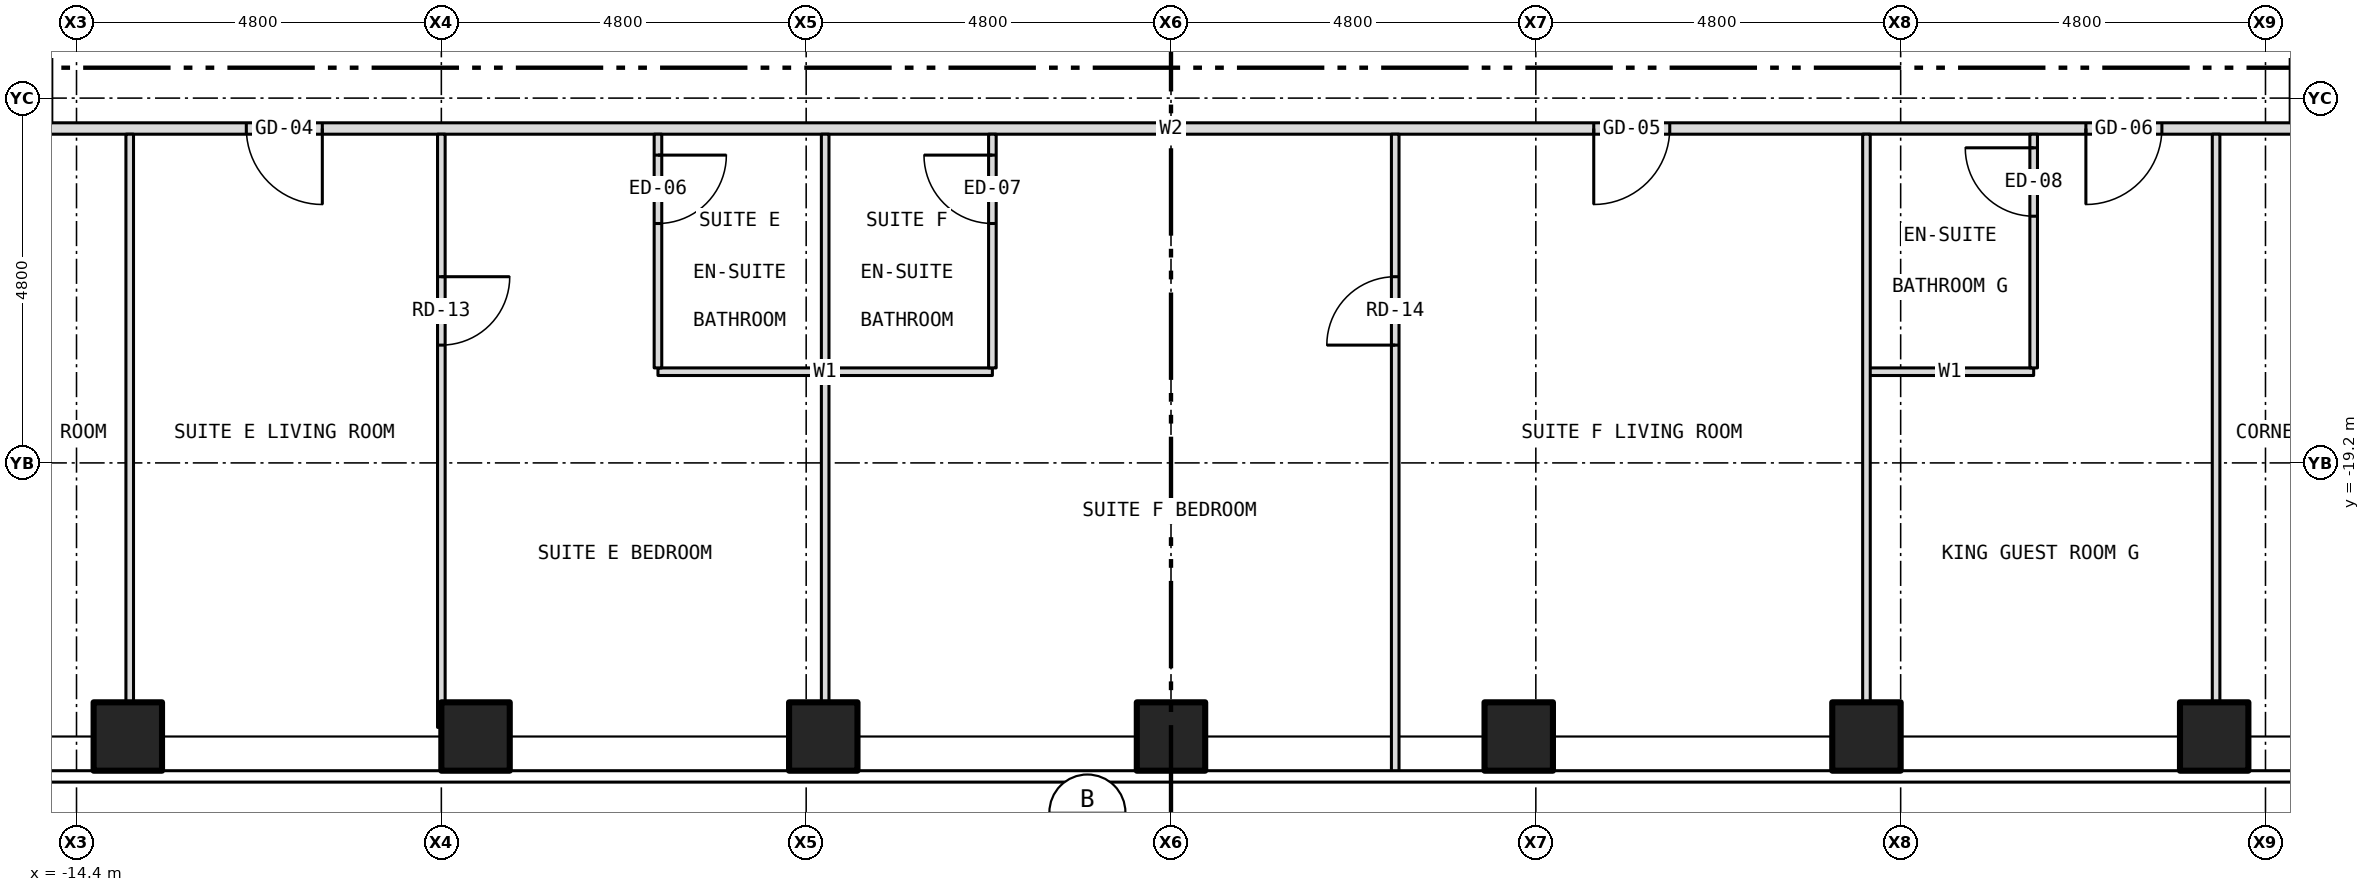
"""IFC4 building model, lengths in metres.
Left out: names, types, materials, properties, quantities, classifications, styles, units other than length and angle.
Written with IfcOpenShell. Run it as: python <this file> out.ifc"""

import sys

from ifc_helpers import new_model, si_unit, direction, frame, frame_2d, origin, origin_2d, place, context, subcontext, project, spatial, rectangle, hollow_rectangle, extrude, element, fill, save


model = new_model("IFC4")
c1 = context("Model", 3, precision=1e-05, world=origin(), true_north=direction((0.0, 1.0)))
c2 = subcontext(c1, "Body", "Model", "MODEL_VIEW")
j1 = project(units=[si_unit("LENGTHUNIT", "METRE"), si_unit("PLANEANGLEUNIT", "RADIAN")], contexts=[c1])
p1 = place(None, origin())
s1 = spatial("IfcSite", under=j1, at=p1, CompositionType="ELEMENT")
p2 = place(p1, origin())
s2 = spatial("IfcBuilding", under=s1, at=p2, CompositionType="ELEMENT")
p3 = place(p2, frame((0.0, 0.0, 113.5)))
s3 = spatial("IfcBuildingStorey", under=s2, at=p3, CompositionType="ELEMENT", Elevation=113.5)
for number, where, z_axis, x_axis in (
    (1, (-13.725, -22.8, -0.15), (0.0, 0.0, 1.0), (1.0, 0.0, 0.0)),
    (2, (-9.15, -22.8, -0.15), (0.0, 0.0, 1.0), (1.0, 0.0, 0.0)),
    (3, (-4.575, -22.8, -0.15), (0.0, 0.0, 1.0), (1.0, 0.0, 0.0)),
    (4, (0.0, -22.8, -0.15), (0.0, 0.0, 1.0), (1.0, 0.0, 0.0)),
    (5, (4.575, -22.8, -0.15), (0.0, 0.0, 1.0), (1.0, 0.0, 0.0)),
    (6, (9.15, -22.8, -0.15), (0.0, 0.0, 1.0), (1.0, 0.0, 0.0)),
    (7, (13.725, -22.8, -0.15), (0.0, 0.0, 1.0), (1.0, 0.0, 0.0)),
):
    element("IfcColumn", number, at=place(p3, frame(where, z_axis=z_axis, x_axis=x_axis)), inside=s3, PredefinedType="COLUMN", context=c2, shape_type="SweptSolid", body=[
        extrude(hollow_rectangle(XDim=0.9, YDim=0.9, WallThickness=0.05, at=origin_2d()), origin(), (0.0, 0.0, 1.0), 3.5),
    ])
p4 = place(p3, frame((-6.75, -18.0, 0.0), z_axis=(0.0, 0.0, 1.0), x_axis=(1.0, 0.0, 0.0)))
e8 = element("IfcWall", 8, at=p4, inside=s3, PredefinedType="PARTITIONING", context=c2, shape_type="SweptSolid", body=[
    extrude(rectangle(XDim=4.4, YDim=0.1, at=frame_2d((2.2, 0.0))), origin(), (0.0, 0.0, 1.0), 3.35),
])
p5 = place(p3, frame((9.15, -18.0, 0.0), z_axis=(0.0, 0.0, 1.0), x_axis=(1.0, 0.0, 0.0)))
e9 = element("IfcWall", 9, at=p5, inside=s3, PredefinedType="PARTITIONING", context=c2, shape_type="SweptSolid", body=[
    extrude(rectangle(XDim=2.2, YDim=0.1, at=frame_2d((1.1, 0.0))), origin(), (0.0, 0.0, 1.0), 3.35),
])
p6 = place(p3, frame((-14.8, -14.8, 0.0), z_axis=(0.0, 0.0, 1.0), x_axis=(1.0, 0.0, 0.0)))
e10 = element("IfcWall", 10, at=p6, inside=s3, PredefinedType="PARTITIONING", context=c2, shape_type="SweptSolid", body=[
    extrude(rectangle(XDim=29.6, YDim=0.15, at=frame_2d((14.8, 0.0))), origin(), (0.0, 0.0, 1.0), 3.35),
])
p7 = place(p6, frame((2.634, 0.0, 0.0)))
e11 = element("IfcOpeningElement", 11, at=p7, cuts=e10, PredefinedType="OPENING", context=c2, shape_type="SweptSolid", body=[
    extrude(rectangle(XDim=1.0, YDim=2.1, at=frame_2d((0.5, 1.05))), frame((0.0, 0.087, 0.0), z_axis=(0.0, -1.0, 0.0), x_axis=(1.0, 0.0, 0.0)), (0.0, 0.0, 1.0), 0.174),
])
p8 = place(p6, frame((20.362, 0.0, 0.0)))
e12 = element("IfcOpeningElement", 12, at=p8, cuts=e10, PredefinedType="OPENING", context=c2, shape_type="SweptSolid", body=[
    extrude(rectangle(XDim=1.0, YDim=2.1, at=frame_2d((0.5, 1.05))), frame((0.0, 0.087, 0.0), z_axis=(0.0, -1.0, 0.0), x_axis=(1.0, 0.0, 0.0)), (0.0, 0.0, 1.0), 0.174),
])
p9 = place(p6, frame((26.837, 0.0, 0.0)))
e13 = element("IfcOpeningElement", 13, at=p9, cuts=e10, PredefinedType="OPENING", context=c2, shape_type="SweptSolid", body=[
    extrude(rectangle(XDim=1.0, YDim=2.1, at=frame_2d((0.5, 1.05))), frame((0.0, 0.087, 0.0), z_axis=(0.0, -1.0, 0.0), x_axis=(1.0, 0.0, 0.0)), (0.0, 0.0, 1.0), 0.174),
])
p10 = place(p3, frame((-13.7, -22.68, 0.0), z_axis=(0.0, 0.0, 1.0), x_axis=(0.0, 1.0, 0.0)))
e14 = element("IfcWall", 14, at=p10, inside=s3, PredefinedType="PARTITIONING", context=c2, shape_type="SweptSolid", body=[
    extrude(rectangle(XDim=7.805, YDim=0.1, at=frame_2d((3.902, 0.0))), origin(), (0.0, 0.0, 1.0), 3.35),
])
p11 = place(p3, frame((-9.6, -22.68, 0.0), z_axis=(0.0, 0.0, 1.0), x_axis=(0.0, 1.0, 0.0)))
e15 = element("IfcWall", 15, at=p11, inside=s3, PredefinedType="PARTITIONING", context=c2, shape_type="SweptSolid", body=[
    extrude(rectangle(XDim=0.33, YDim=0.1, at=frame_2d((0.165, 0.0))), origin(), (0.0, 0.0, 1.0), 3.35),
])
p12 = place(p3, frame((-9.6, -22.35, 0.0), z_axis=(0.0, 0.0, 1.0), x_axis=(0.0, 1.0, 0.0)))
e16 = element("IfcWall", 16, at=p12, inside=s3, PredefinedType="PARTITIONING", context=c2, shape_type="SweptSolid", body=[
    extrude(rectangle(XDim=7.475, YDim=0.1, at=frame_2d((3.738, 0.0))), origin(), (0.0, 0.0, 1.0), 2.728),
])
p13 = place(p12, frame((4.7, 0.0, 0.0)))
e17 = element("IfcOpeningElement", 17, at=p13, cuts=e16, PredefinedType="OPENING", context=c2, shape_type="SweptSolid", body=[
    extrude(rectangle(XDim=0.9, YDim=2.1, at=frame_2d((0.45, 1.05))), frame((0.0, 0.062, 0.0), z_axis=(0.0, -1.0, 0.0), x_axis=(1.0, 0.0, 0.0)), (0.0, 0.0, 1.0), 0.124),
])
p14 = place(p3, frame((-6.75, -17.95, 0.0), z_axis=(0.0, 0.0, 1.0), x_axis=(0.0, 1.0, 0.0)))
e18 = element("IfcWall", 18, at=p14, inside=s3, PredefinedType="PARTITIONING", context=c2, shape_type="SweptSolid", body=[
    extrude(rectangle(XDim=3.075, YDim=0.1, at=frame_2d((1.538, 0.0))), origin(), (0.0, 0.0, 1.0), 3.35),
])
p15 = place(p14, frame((1.9, 0.0, 0.0)))
e19 = element("IfcOpeningElement", 19, at=p15, cuts=e18, PredefinedType="OPENING", context=c2, shape_type="SweptSolid", body=[
    extrude(rectangle(XDim=0.9, YDim=2.1, at=frame_2d((0.45, 1.05))), frame((0.0, 0.062, 0.0), z_axis=(0.0, -1.0, 0.0), x_axis=(1.0, 0.0, 0.0)), (0.0, 0.0, 1.0), 0.124),
])
p16 = place(p3, frame((-4.55, -22.68, 0.0), z_axis=(0.0, 0.0, 1.0), x_axis=(0.0, 1.0, 0.0)))
e20 = element("IfcWall", 20, at=p16, inside=s3, PredefinedType="PARTITIONING", context=c2, shape_type="SweptSolid", body=[
    extrude(rectangle(XDim=4.63, YDim=0.1, at=frame_2d((2.315, 0.0))), origin(), (0.0, 0.0, 1.0), 3.35),
])
p17 = place(p3, frame((-4.55, -17.95, 0.0), z_axis=(0.0, 0.0, 1.0), x_axis=(0.0, 1.0, 0.0)))
e21 = element("IfcWall", 21, at=p17, inside=s3, PredefinedType="PARTITIONING", context=c2, shape_type="SweptSolid", body=[
    extrude(rectangle(XDim=3.075, YDim=0.1, at=frame_2d((1.538, 0.0))), origin(), (0.0, 0.0, 1.0), 3.35),
])
p18 = place(p3, frame((-2.35, -17.95, 0.0), z_axis=(0.0, 0.0, 1.0), x_axis=(0.0, 1.0, 0.0)))
e22 = element("IfcWall", 22, at=p18, inside=s3, PredefinedType="PARTITIONING", context=c2, shape_type="SweptSolid", body=[
    extrude(rectangle(XDim=3.075, YDim=0.1, at=frame_2d((1.538, 0.0))), origin(), (0.0, 0.0, 1.0), 3.35),
])
p19 = place(p18, frame((1.9, 0.0, 0.0)))
e23 = element("IfcOpeningElement", 23, at=p19, cuts=e22, PredefinedType="OPENING", context=c2, shape_type="SweptSolid", body=[
    extrude(rectangle(XDim=0.9, YDim=2.1, at=frame_2d((0.45, 1.05))), frame((0.0, 0.062, 0.0), z_axis=(0.0, -1.0, 0.0), x_axis=(1.0, 0.0, 0.0)), (0.0, 0.0, 1.0), 0.124),
])
p20 = place(p3, frame((2.95, -23.28, 0.0), z_axis=(0.0, 0.0, 1.0), x_axis=(0.0, 1.0, 0.0)))
e24 = element("IfcWall", 24, at=p20, inside=s3, PredefinedType="PARTITIONING", context=c2, shape_type="SweptSolid", body=[
    extrude(rectangle(XDim=8.405, YDim=0.1, at=frame_2d((4.203, 0.0))), origin(), (0.0, 0.0, 1.0), 3.35),
])
p21 = place(p20, frame((5.63, 0.0, 0.0)))
e25 = element("IfcOpeningElement", 25, at=p21, cuts=e24, PredefinedType="OPENING", context=c2, shape_type="SweptSolid", body=[
    extrude(rectangle(XDim=0.9, YDim=2.1, at=frame_2d((0.45, 1.05))), frame((0.0, 0.062, 0.0), z_axis=(0.0, -1.0, 0.0), x_axis=(1.0, 0.0, 0.0)), (0.0, 0.0, 1.0), 0.124),
])
p22 = place(p3, frame((9.15, -22.68, 0.0), z_axis=(0.0, 0.0, 1.0), x_axis=(0.0, 1.0, 0.0)))
e26 = element("IfcWall", 26, at=p22, inside=s3, PredefinedType="PARTITIONING", context=c2, shape_type="SweptSolid", body=[
    extrude(rectangle(XDim=7.805, YDim=0.1, at=frame_2d((3.902, 0.0))), origin(), (0.0, 0.0, 1.0), 3.35),
])
p23 = place(p3, frame((11.35, -17.95, 0.0), z_axis=(0.0, 0.0, 1.0), x_axis=(0.0, 1.0, 0.0)))
e27 = element("IfcWall", 27, at=p23, inside=s3, PredefinedType="PARTITIONING", context=c2, shape_type="SweptSolid", body=[
    extrude(rectangle(XDim=3.075, YDim=0.1, at=frame_2d((1.538, 0.0))), origin(), (0.0, 0.0, 1.0), 3.35),
])
p24 = place(p23, frame((1.996, 0.0, 0.0)))
e28 = element("IfcOpeningElement", 28, at=p24, cuts=e27, PredefinedType="OPENING", context=c2, shape_type="SweptSolid", body=[
    extrude(rectangle(XDim=0.9, YDim=2.1, at=frame_2d((0.45, 1.05))), frame((0.0, 0.062, 0.0), z_axis=(0.0, -1.0, 0.0), x_axis=(1.0, 0.0, 0.0)), (0.0, 0.0, 1.0), 0.124),
])
p25 = place(p3, frame((13.75, -22.68, 0.0), z_axis=(0.0, 0.0, 1.0), x_axis=(0.0, 1.0, 0.0)))
e29 = element("IfcWall", 29, at=p25, inside=s3, PredefinedType="PARTITIONING", context=c2, shape_type="SweptSolid", body=[
    extrude(rectangle(XDim=7.805, YDim=0.1, at=frame_2d((3.902, 0.0))), origin(), (0.0, 0.0, 1.0), 3.35),
])
p26 = place(p7, origin())
e30 = element("IfcDoor", 30, at=p26, inside=s3, OperationType="SINGLE_SWING_RIGHT", PredefinedType="DOOR", context=c2, shape_type="SweptSolid", body=[
    extrude(rectangle(XDim=1.0, YDim=2.1, at=frame_2d((0.5, 1.05))), frame((0.0, 0.025, 0.0), z_axis=(0.0, -1.0, 0.0), x_axis=(1.0, 0.0, 0.0)), (0.0, 0.0, 1.0), 0.05),
])
fill(e11, e30)
p27 = place(p13, origin())
e31 = element("IfcDoor", 31, at=p27, inside=s3, OperationType="SINGLE_SWING_RIGHT", PredefinedType="DOOR", context=c2, shape_type="SweptSolid", body=[
    extrude(rectangle(XDim=0.9, YDim=2.1, at=frame_2d((0.45, 1.05))), frame((0.0, 0.025, 0.0), z_axis=(0.0, -1.0, 0.0), x_axis=(1.0, 0.0, 0.0)), (0.0, 0.0, 1.0), 0.05),
])
fill(e17, e31)
p28 = place(p15, origin())
e32 = element("IfcDoor", 32, at=p28, inside=s3, OperationType="SINGLE_SWING_RIGHT", PredefinedType="DOOR", context=c2, shape_type="SweptSolid", body=[
    extrude(rectangle(XDim=0.9, YDim=2.1, at=frame_2d((0.45, 1.05))), frame((0.0, 0.025, 0.0), z_axis=(0.0, -1.0, 0.0), x_axis=(1.0, 0.0, 0.0)), (0.0, 0.0, 1.0), 0.05),
])
fill(e19, e32)
p29 = place(p8, origin())
e33 = element("IfcDoor", 33, at=p29, inside=s3, OperationType="SINGLE_SWING_LEFT", PredefinedType="DOOR", context=c2, shape_type="SweptSolid", body=[
    extrude(rectangle(XDim=1.0, YDim=2.1, at=frame_2d((0.5, 1.05))), frame((0.0, 0.025, 0.0), z_axis=(0.0, -1.0, 0.0), x_axis=(1.0, 0.0, 0.0)), (0.0, 0.0, 1.0), 0.05),
])
fill(e12, e33)
p30 = place(p21, origin())
e34 = element("IfcDoor", 34, at=p30, inside=s3, OperationType="SINGLE_SWING_LEFT", PredefinedType="DOOR", context=c2, shape_type="SweptSolid", body=[
    extrude(rectangle(XDim=0.9, YDim=2.1, at=frame_2d((0.45, 1.05))), frame((0.0, 0.025, 0.0), z_axis=(0.0, -1.0, 0.0), x_axis=(1.0, 0.0, 0.0)), (0.0, 0.0, 1.0), 0.05),
])
fill(e25, e34)
p31 = place(p19, origin())
e35 = element("IfcDoor", 35, at=p31, inside=s3, OperationType="SINGLE_SWING_RIGHT", PredefinedType="DOOR", context=c2, shape_type="SweptSolid", body=[
    extrude(rectangle(XDim=0.9, YDim=2.1, at=frame_2d((0.45, 1.05))), frame((0.0, 0.025, 0.0), z_axis=(0.0, -1.0, 0.0), x_axis=(1.0, 0.0, 0.0)), (0.0, 0.0, 1.0), 0.05),
])
fill(e23, e35)
p32 = place(p9, origin())
e36 = element("IfcDoor", 36, at=p32, inside=s3, OperationType="SINGLE_SWING_LEFT", PredefinedType="DOOR", context=c2, shape_type="SweptSolid", body=[
    extrude(rectangle(XDim=1.0, YDim=2.1, at=frame_2d((0.5, 1.05))), frame((0.0, 0.025, 0.0), z_axis=(0.0, -1.0, 0.0), x_axis=(1.0, 0.0, 0.0)), (0.0, 0.0, 1.0), 0.05),
])
fill(e13, e36)
p33 = place(p24, origin())
e37 = element("IfcDoor", 37, at=p33, inside=s3, OperationType="SINGLE_SWING_RIGHT", PredefinedType="DOOR", context=c2, shape_type="SweptSolid", body=[
    extrude(rectangle(XDim=0.9, YDim=2.1, at=frame_2d((0.45, 1.05))), frame((0.0, 0.025, 0.0), z_axis=(0.0, -1.0, 0.0), x_axis=(1.0, 0.0, 0.0)), (0.0, 0.0, 1.0), 0.05),
])
fill(e28, e37)
save(model, sys.argv[1])
